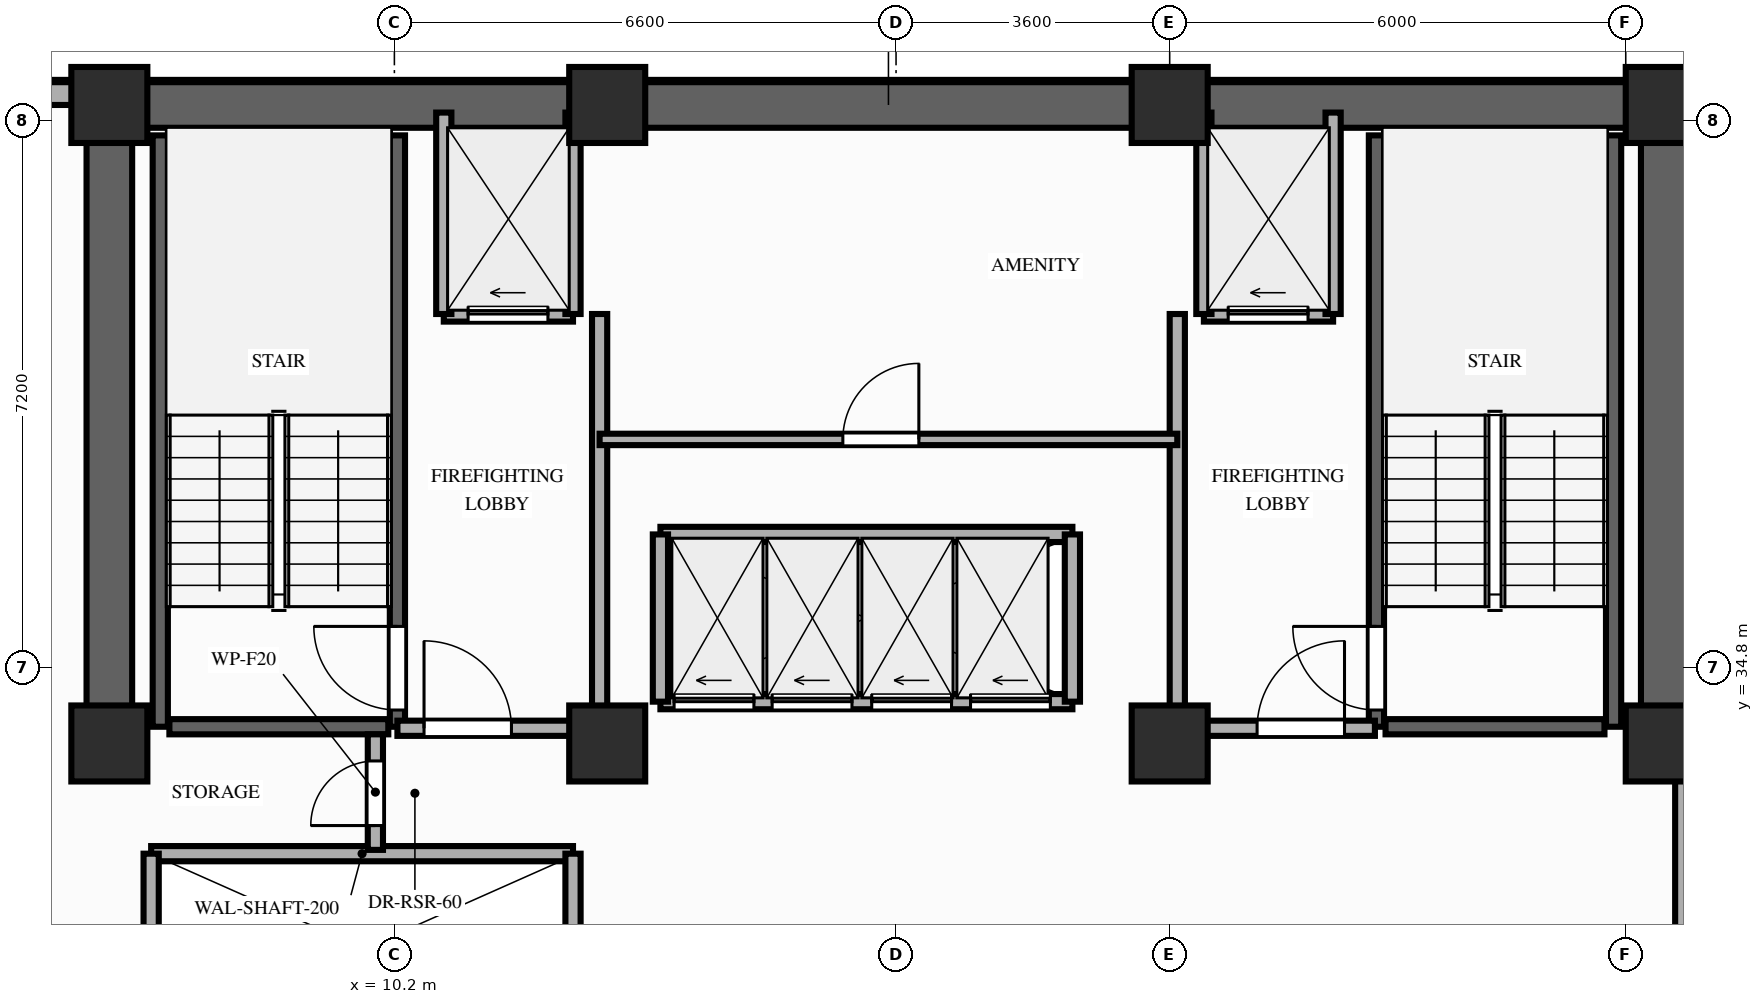
"""IFC4 building model, lengths in metres.
Left out: names, types, materials, properties, quantities, classifications, styles, units other than length and angle.
Written with IfcOpenShell. Run it as: python <this file> out.ifc"""

import sys

from ifc_helpers import new_model, si_unit, direction, frame, frame_2d, origin, origin_2d, place, context, subcontext, project, spatial, rectangle, extrude, element, fill, save


model = new_model("IFC4")
c1 = context("Model", 3, precision=1e-05, world=origin(), true_north=direction((0.0, 1.0)))
c2 = subcontext(c1, "Body", "Model", "MODEL_VIEW")
j1 = project(units=[si_unit("LENGTHUNIT", "METRE"), si_unit("PLANEANGLEUNIT", "RADIAN")], contexts=[c1])
p1 = place(None, origin())
s1 = spatial("IfcSite", under=j1, at=p1, CompositionType="ELEMENT")
p2 = place(p1, origin())
s2 = spatial("IfcBuilding", under=s1, at=p2, CompositionType="ELEMENT")
p3 = place(p2, frame((0.0, 0.0, 126.6)))
s3 = spatial("IfcBuildingStorey", under=s2, at=p3, CompositionType="ELEMENT", Elevation=126.6)
for number, where, z_axis, x_axis in (
    (1, (6.45, 33.8, 0.0), (0.0, 0.0, 1.0), (1.0, 0.0, 0.0)),
    (2, (13.0, 33.8, 0.0), (0.0, 0.0, 1.0), (1.0, 0.0, 0.0)),
    (3, (20.4, 33.8, 0.0), (0.0, 0.0, 1.0), (1.0, 0.0, 0.0)),
    (4, (26.9, 33.8, 0.0), (0.0, 0.0, 1.0), (1.0, 0.0, 0.0)),
    (5, (6.45, 42.2, 0.0), (0.0, 0.0, 1.0), (1.0, 0.0, 0.0)),
    (6, (13.0, 42.2, 0.0), (0.0, 0.0, 1.0), (1.0, 0.0, 0.0)),
    (7, (20.4, 42.2, 0.0), (0.0, 0.0, 1.0), (1.0, 0.0, 0.0)),
    (8, (26.9, 42.2, 0.0), (0.0, 0.0, 1.0), (1.0, 0.0, 0.0)),
):
    element("IfcColumn", number, at=place(p3, frame(where, z_axis=z_axis, x_axis=x_axis)), inside=s3, PredefinedType="COLUMN", context=c2, shape_type="SweptSolid", body=[
        extrude(rectangle(XDim=1.0, YDim=1.0, at=origin_2d()), origin(), (0.0, 0.0, 1.0), 3.2),
    ])
p4 = place(p3, frame((6.0, 42.35, 0.0), z_axis=(0.0, 0.0, 1.0), x_axis=(-1.0, 0.0, 0.0)))
e9 = element("IfcWall", 9, at=p4, inside=s3, PredefinedType="STANDARD", context=c2, shape_type="SweptSolid", body=[
    extrude(rectangle(XDim=2.0, YDim=0.3, at=frame_2d((1.0, 0.0))), origin(), (0.0, 0.0, 1.0), 3.02),
])
p5 = place(p3, frame((6.45, 42.2, 0.0), z_axis=(0.0, 0.0, 1.0), x_axis=(1.0, 0.0, 0.0)))
e10 = element("IfcWall", 10, at=p5, inside=s3, PredefinedType="SHEAR", context=c2, shape_type="SweptSolid", body=[
    extrude(rectangle(XDim=20.45, YDim=0.6, at=frame_2d((10.225, 0.0))), origin(), (0.0, 0.0, 1.0), 3.02),
])
for number, where, z_axis, x_axis in (
    (11, (6.45, 33.8, 0.0), (0.0, 0.0, 1.0), (0.0, 1.0, 0.0)),
    (12, (26.9, 33.8, 0.0), (0.0, 0.0, 1.0), (0.0, 1.0, 0.0)),
):
    element("IfcWall", number, at=place(p3, frame(where, z_axis=z_axis, x_axis=x_axis)), inside=s3, PredefinedType="SHEAR", context=c2, shape_type="SweptSolid", body=[
        extrude(rectangle(XDim=7.95, YDim=0.6, at=frame_2d((3.975, 0.0))), origin(), (0.0, 0.0, 1.0), 3.02),
    ])
p6 = place(p3, frame((7.12, 34.02, 0.0), z_axis=(0.0, 0.0, 1.0), x_axis=(0.0, 1.0, 0.0)))
e13 = element("IfcWall", 13, at=p6, inside=s3, PredefinedType="SHEAR", context=c2, shape_type="SweptSolid", body=[
    extrude(rectangle(XDim=7.78, YDim=0.2, at=frame_2d((3.89, 0.0))), origin(), (0.0, 0.0, 1.0), 3.02),
])
p7 = place(p3, frame((10.24, 34.02, 0.0), z_axis=(0.0, 0.0, 1.0), x_axis=(0.0, 1.0, 0.0)))
e14 = element("IfcWall", 14, at=p7, inside=s3, PredefinedType="SHEAR", context=c2, shape_type="SweptSolid", body=[
    extrude(rectangle(XDim=7.78, YDim=0.2, at=frame_2d((3.89, 0.0))), origin(), (0.0, 0.0, 1.0), 3.02),
])
p8 = place(p7, frame((0.22, 0.0, 0.0)))
e15 = element("IfcOpeningElement", 15, at=p8, cuts=e14, PredefinedType="OPENING", context=c2, shape_type="SweptSolid", body=[
    extrude(rectangle(XDim=1.1, YDim=2.15, at=frame_2d((0.55, 1.075))), frame((0.0, 0.11, 0.0), z_axis=(0.0, -1.0, 0.0), x_axis=(1.0, 0.0, 0.0)), (0.0, 0.0, 1.0), 0.22),
])
p9 = place(p3, frame((7.24, 34.02, 0.0), z_axis=(0.0, 0.0, 1.0), x_axis=(1.0, 0.0, 0.0)))
e16 = element("IfcWall", 16, at=p9, inside=s3, PredefinedType="SHEAR", context=c2, shape_type="SweptSolid", body=[
    extrude(rectangle(XDim=2.88, YDim=0.2, at=frame_2d((1.44, 0.0))), origin(), (0.0, 0.0, 1.0), 3.02),
])
p10 = place(p3, frame((23.12, 34.02, 0.0), z_axis=(0.0, 0.0, 1.0), x_axis=(0.0, 1.0, 0.0)))
e17 = element("IfcWall", 17, at=p10, inside=s3, PredefinedType="SHEAR", context=c2, shape_type="SweptSolid", body=[
    extrude(rectangle(XDim=7.78, YDim=0.2, at=frame_2d((3.89, 0.0))), origin(), (0.0, 0.0, 1.0), 3.02),
])
p11 = place(p10, frame((0.22, 0.0, 0.0)))
e18 = element("IfcOpeningElement", 18, at=p11, cuts=e17, PredefinedType="OPENING", context=c2, shape_type="SweptSolid", body=[
    extrude(rectangle(XDim=1.1, YDim=2.15, at=frame_2d((0.55, 1.075))), frame((0.0, 0.11, 0.0), z_axis=(0.0, -1.0, 0.0), x_axis=(1.0, 0.0, 0.0)), (0.0, 0.0, 1.0), 0.22),
])
p12 = place(p3, frame((26.24, 34.02, 0.0), z_axis=(0.0, 0.0, 1.0), x_axis=(0.0, 1.0, 0.0)))
e19 = element("IfcWall", 19, at=p12, inside=s3, PredefinedType="SHEAR", context=c2, shape_type="SweptSolid", body=[
    extrude(rectangle(XDim=7.78, YDim=0.2, at=frame_2d((3.89, 0.0))), origin(), (0.0, 0.0, 1.0), 3.02),
])
p13 = place(p3, frame((23.24, 34.02, 0.0), z_axis=(0.0, 0.0, 1.0), x_axis=(1.0, 0.0, 0.0)))
e20 = element("IfcWall", 20, at=p13, inside=s3, PredefinedType="SHEAR", context=c2, shape_type="SweptSolid", body=[
    extrude(rectangle(XDim=2.88, YDim=0.2, at=frame_2d((1.44, 0.0))), origin(), (0.0, 0.0, 1.0), 3.02),
])
p14 = place(p3, frame((7.0, 32.35, 0.0), z_axis=(0.0, 0.0, 1.0), x_axis=(1.0, 0.0, 0.0)))
e21 = element("IfcWall", 21, at=p14, inside=s3, PredefinedType="MOVABLE", context=c2, shape_type="SweptSolid", body=[
    extrude(rectangle(XDim=5.55, YDim=0.2, at=frame_2d((2.775, 0.0))), origin(), (0.0, 0.0, 1.0), 3.02),
])
for number, where, z_axis, x_axis in (
    (22, (7.0, 29.85, 0.0), (0.0, 0.0, 1.0), (0.0, 1.0, 0.0)),
    (23, (12.55, 29.85, 0.0), (0.0, 0.0, 1.0), (0.0, 1.0, 0.0)),
):
    element("IfcWall", number, at=place(p3, frame(where, z_axis=z_axis, x_axis=x_axis)), inside=s3, PredefinedType="MOVABLE", context=c2, shape_type="SweptSolid", body=[
        extrude(rectangle(XDim=2.5, YDim=0.2, at=frame_2d((1.25, 0.0))), origin(), (0.0, 0.0, 1.0), 3.02),
    ])
p15 = place(p3, frame((10.85, 39.45, 0.0), z_axis=(0.0, 0.0, 1.0), x_axis=(1.0, 0.0, 0.0)))
e24 = element("IfcWall", 24, at=p15, inside=s3, PredefinedType="MOVABLE", context=c2, shape_type="SweptSolid", body=[
    extrude(rectangle(XDim=1.7, YDim=0.2, at=frame_2d((0.85, 0.0))), origin(), (0.0, 0.0, 1.0), 3.02),
])
p16 = place(p15, frame((0.32, 0.0, 0.0)))
e25 = element("IfcOpeningElement", 25, at=p16, cuts=e24, PredefinedType="OPENING", context=c2, shape_type="SweptSolid", body=[
    extrude(rectangle(XDim=1.05, YDim=2.15, at=frame_2d((0.525, 1.075))), frame((0.0, 0.11, 0.0), z_axis=(0.0, -1.0, 0.0), x_axis=(1.0, 0.0, 0.0)), (0.0, 0.0, 1.0), 0.22),
])
p17 = place(p3, frame((20.85, 39.45, 0.0), z_axis=(0.0, 0.0, 1.0), x_axis=(1.0, 0.0, 0.0)))
e26 = element("IfcWall", 26, at=p17, inside=s3, PredefinedType="MOVABLE", context=c2, shape_type="SweptSolid", body=[
    extrude(rectangle(XDim=1.7, YDim=0.2, at=frame_2d((0.85, 0.0))), origin(), (0.0, 0.0, 1.0), 3.02),
])
p18 = place(p17, frame((0.32, 0.0, 0.0)))
e27 = element("IfcOpeningElement", 27, at=p18, cuts=e26, PredefinedType="OPENING", context=c2, shape_type="SweptSolid", body=[
    extrude(rectangle(XDim=1.05, YDim=2.15, at=frame_2d((0.525, 1.075))), frame((0.0, 0.11, 0.0), z_axis=(0.0, -1.0, 0.0), x_axis=(1.0, 0.0, 0.0)), (0.0, 0.0, 1.0), 0.22),
])
for number, where, z_axis, x_axis in (
    (28, (10.85, 39.45, 0.0), (0.0, 0.0, 1.0), (0.0, 1.0, 0.0)),
    (29, (12.55, 39.45, 0.0), (0.0, 0.0, 1.0), (0.0, 1.0, 0.0)),
):
    element("IfcWall", number, at=place(p3, frame(where, z_axis=z_axis, x_axis=x_axis)), inside=s3, PredefinedType="MOVABLE", context=c2, shape_type="SweptSolid", body=[
        extrude(rectangle(XDim=2.65, YDim=0.2, at=frame_2d((1.325, 0.0))), origin(), (0.0, 0.0, 1.0), 2.45),
    ])
p19 = place(p3, frame((12.9, 34.0, 0.0), z_axis=(0.0, 0.0, 1.0), x_axis=(0.0, 1.0, 0.0)))
e30 = element("IfcWall", 30, at=p19, inside=s3, PredefinedType="PARTITIONING", context=c2, shape_type="SweptSolid", body=[
    extrude(rectangle(XDim=5.45, YDim=0.2, at=frame_2d((2.725, 0.0))), origin(), (0.0, 0.0, 1.0), 2.45),
])
p20 = place(p3, frame((10.24, 34.0, 0.0), z_axis=(0.0, 0.0, 1.0), x_axis=(1.0, 0.0, 0.0)))
e31 = element("IfcWall", 31, at=p20, inside=s3, PredefinedType="PARTITIONING", context=c2, shape_type="SweptSolid", body=[
    extrude(rectangle(XDim=2.66, YDim=0.2, at=frame_2d((1.33, 0.0))), origin(), (0.0, 0.0, 1.0), 2.45),
])
p21 = place(p20, frame((0.35, 0.0, 0.0)))
e32 = element("IfcOpeningElement", 32, at=p21, cuts=e31, PredefinedType="OPENING", context=c2, shape_type="SweptSolid", body=[
    extrude(rectangle(XDim=1.15, YDim=2.15, at=frame_2d((0.575, 1.075))), frame((0.0, 0.11, 0.0), z_axis=(0.0, -1.0, 0.0), x_axis=(1.0, 0.0, 0.0)), (0.0, 0.0, 1.0), 0.22),
])
for number, where, z_axis, x_axis in (
    (33, (20.85, 39.45, 0.0), (0.0, 0.0, 1.0), (0.0, 1.0, 0.0)),
    (34, (22.55, 39.45, 0.0), (0.0, 0.0, 1.0), (0.0, 1.0, 0.0)),
):
    element("IfcWall", number, at=place(p3, frame(where, z_axis=z_axis, x_axis=x_axis)), inside=s3, PredefinedType="MOVABLE", context=c2, shape_type="SweptSolid", body=[
        extrude(rectangle(XDim=2.65, YDim=0.2, at=frame_2d((1.325, 0.0))), origin(), (0.0, 0.0, 1.0), 2.45),
    ])
p22 = place(p3, frame((20.5, 34.0, 0.0), z_axis=(0.0, 0.0, 1.0), x_axis=(0.0, 1.0, 0.0)))
e35 = element("IfcWall", 35, at=p22, inside=s3, PredefinedType="PARTITIONING", context=c2, shape_type="SweptSolid", body=[
    extrude(rectangle(XDim=5.45, YDim=0.2, at=frame_2d((2.725, 0.0))), origin(), (0.0, 0.0, 1.0), 2.45),
])
p23 = place(p3, frame((20.5, 34.0, 0.0), z_axis=(0.0, 0.0, 1.0), x_axis=(1.0, 0.0, 0.0)))
e36 = element("IfcWall", 36, at=p23, inside=s3, PredefinedType="PARTITIONING", context=c2, shape_type="SweptSolid", body=[
    extrude(rectangle(XDim=2.6, YDim=0.2, at=frame_2d((1.3, 0.0))), origin(), (0.0, 0.0, 1.0), 2.45),
])
p24 = place(p23, frame((1.05, 0.0, 0.0)))
e37 = element("IfcOpeningElement", 37, at=p24, cuts=e36, PredefinedType="OPENING", context=c2, shape_type="SweptSolid", body=[
    extrude(rectangle(XDim=1.15, YDim=2.15, at=frame_2d((0.575, 1.075))), frame((0.0, 0.11, 0.0), z_axis=(0.0, -1.0, 0.0), x_axis=(1.0, 0.0, 0.0)), (0.0, 0.0, 1.0), 0.22),
])
p25 = place(p3, frame((9.95, 32.4, 0.0), z_axis=(0.0, 0.0, 1.0), x_axis=(0.0, 1.0, 0.0)))
e38 = element("IfcWall", 38, at=p25, inside=s3, PredefinedType="PARTITIONING", context=c2, shape_type="SweptSolid", body=[
    extrude(rectangle(XDim=1.52, YDim=0.2, at=frame_2d((0.76, 0.0))), origin(), (0.0, 0.0, 1.0), 2.45),
])
p26 = place(p25, frame((0.32, 0.0, 0.0)))
e39 = element("IfcOpeningElement", 39, at=p26, cuts=e38, PredefinedType="OPENING", context=c2, shape_type="SweptSolid", body=[
    extrude(rectangle(XDim=0.85, YDim=2.05, at=frame_2d((0.425, 1.025))), frame((0.0, 0.11, 0.0), z_axis=(0.0, -1.0, 0.0), x_axis=(1.0, 0.0, 0.0)), (0.0, 0.0, 1.0), 0.22),
])
p27 = place(p3, frame((12.9, 37.8, 0.0), z_axis=(0.0, 0.0, 1.0), x_axis=(1.0, 0.0, 0.0)))
e40 = element("IfcWall", 40, at=p27, inside=s3, PredefinedType="PARTITIONING", context=c2, shape_type="SweptSolid", body=[
    extrude(rectangle(XDim=7.6, YDim=0.15, at=frame_2d((3.8, 0.0))), origin(), (0.0, 0.0, 1.0), 3.02),
])
p28 = place(p27, frame((3.2, 0.0, 0.0)))
e41 = element("IfcOpeningElement", 41, at=p28, cuts=e40, PredefinedType="OPENING", context=c2, shape_type="SweptSolid", body=[
    extrude(rectangle(XDim=1.0, YDim=2.15, at=frame_2d((0.5, 1.075))), frame((0.0, 0.085, 0.0), z_axis=(0.0, -1.0, 0.0), x_axis=(1.0, 0.0, 0.0)), (0.0, 0.0, 1.0), 0.17),
])
p29 = place(p3, frame((13.7, 34.35, 0.0), z_axis=(0.0, 0.0, 1.0), x_axis=(1.0, 0.0, 0.0)))
e42 = element("IfcWall", 42, at=p29, inside=s3, PredefinedType="MOVABLE", context=c2, shape_type="SweptSolid", body=[
    extrude(rectangle(XDim=5.42, YDim=0.2, at=frame_2d((2.71, 0.0))), origin(), (0.0, 0.0, 1.0), 3.02),
])
p30 = place(p29, frame((0.18, 0.0, 0.0)))
e43 = element("IfcOpeningElement", 43, at=p30, cuts=e42, PredefinedType="OPENING", context=c2, shape_type="SweptSolid", body=[
    extrude(rectangle(XDim=1.05, YDim=2.15, at=frame_2d((0.525, 1.075))), frame((0.0, 0.11, 0.0), z_axis=(0.0, -1.0, 0.0), x_axis=(1.0, 0.0, 0.0)), (0.0, 0.0, 1.0), 0.22),
])
p31 = place(p29, frame((1.47, 0.0, 0.0)))
e44 = element("IfcOpeningElement", 44, at=p31, cuts=e42, PredefinedType="OPENING", context=c2, shape_type="SweptSolid", body=[
    extrude(rectangle(XDim=1.05, YDim=2.15, at=frame_2d((0.525, 1.075))), frame((0.0, 0.11, 0.0), z_axis=(0.0, -1.0, 0.0), x_axis=(1.0, 0.0, 0.0)), (0.0, 0.0, 1.0), 0.22),
])
p32 = place(p29, frame((2.78, 0.0, 0.0)))
e45 = element("IfcOpeningElement", 45, at=p32, cuts=e42, PredefinedType="OPENING", context=c2, shape_type="SweptSolid", body=[
    extrude(rectangle(XDim=1.05, YDim=2.15, at=frame_2d((0.525, 1.075))), frame((0.0, 0.11, 0.0), z_axis=(0.0, -1.0, 0.0), x_axis=(1.0, 0.0, 0.0)), (0.0, 0.0, 1.0), 0.22),
])
p33 = place(p29, frame((4.08, 0.0, 0.0)))
e46 = element("IfcOpeningElement", 46, at=p33, cuts=e42, PredefinedType="OPENING", context=c2, shape_type="SweptSolid", body=[
    extrude(rectangle(XDim=1.05, YDim=2.15, at=frame_2d((0.525, 1.075))), frame((0.0, 0.11, 0.0), z_axis=(0.0, -1.0, 0.0), x_axis=(1.0, 0.0, 0.0)), (0.0, 0.0, 1.0), 0.22),
])
p34 = place(p3, frame((13.7, 36.55, 0.0), z_axis=(0.0, 0.0, 1.0), x_axis=(1.0, 0.0, 0.0)))
e47 = element("IfcWall", 47, at=p34, inside=s3, PredefinedType="MOVABLE", context=c2, shape_type="SweptSolid", body=[
    extrude(rectangle(XDim=5.42, YDim=0.2, at=frame_2d((2.71, 0.0))), origin(), (0.0, 0.0, 1.0), 3.02),
])
for number, where, z_axis, x_axis in (
    (48, (13.7, 34.35, 0.0), (0.0, 0.0, 1.0), (0.0, 1.0, 0.0)),
    (49, (19.12, 34.35, 0.0), (0.0, 0.0, 1.0), (0.0, 1.0, 0.0)),
):
    element("IfcWall", number, at=place(p3, frame(where, z_axis=z_axis, x_axis=x_axis)), inside=s3, PredefinedType="MOVABLE", context=c2, shape_type="SweptSolid", body=[
        extrude(rectangle(XDim=2.2, YDim=0.2, at=frame_2d((1.1, 0.0))), origin(), (0.0, 0.0, 1.0), 3.02),
    ])
p35 = place(p3, frame((27.15, 31.2, 0.0), z_axis=(0.0, 0.0, 1.0), x_axis=(0.0, 1.0, 0.0)))
e50 = element("IfcWall", 50, at=p35, inside=s3, PredefinedType="PARTITIONING", context=c2, shape_type="SweptSolid", body=[
    extrude(rectangle(XDim=2.48, YDim=0.2, at=frame_2d((1.24, 0.0))), origin(), (0.0, 0.0, 1.0), 2.45),
])
p36 = place(p8, origin())
e51 = element("IfcDoor", 51, at=p36, inside=s3, OperationType="SINGLE_SWING_RIGHT", PredefinedType="DOOR", context=c2, shape_type="SweptSolid", body=[
    extrude(rectangle(XDim=1.1, YDim=2.15, at=frame_2d((0.55, 1.075))), frame((0.0, 0.025, 0.0), z_axis=(0.0, -1.0, 0.0), x_axis=(1.0, 0.0, 0.0)), (0.0, 0.0, 1.0), 0.05),
])
fill(e15, e51)
p37 = place(p11, origin())
e52 = element("IfcDoor", 52, at=p37, inside=s3, OperationType="SINGLE_SWING_RIGHT", PredefinedType="DOOR", context=c2, shape_type="SweptSolid", body=[
    extrude(rectangle(XDim=1.1, YDim=2.15, at=frame_2d((0.55, 1.075))), frame((0.0, 0.025, 0.0), z_axis=(0.0, -1.0, 0.0), x_axis=(1.0, 0.0, 0.0)), (0.0, 0.0, 1.0), 0.05),
])
fill(e18, e52)
p38 = place(p16, origin())
e53 = element("IfcDoor", 53, at=p38, inside=s3, OperationType="SLIDING_TO_LEFT", PredefinedType="DOOR", context=c2, shape_type="SweptSolid", body=[
    extrude(rectangle(XDim=1.05, YDim=2.15, at=frame_2d((0.525, 1.075))), frame((0.0, 0.025, 0.0), z_axis=(0.0, -1.0, 0.0), x_axis=(1.0, 0.0, 0.0)), (0.0, 0.0, 1.0), 0.05),
])
fill(e25, e53)
p39 = place(p18, origin())
e54 = element("IfcDoor", 54, at=p39, inside=s3, OperationType="SLIDING_TO_LEFT", PredefinedType="DOOR", context=c2, shape_type="SweptSolid", body=[
    extrude(rectangle(XDim=1.05, YDim=2.15, at=frame_2d((0.525, 1.075))), frame((0.0, 0.025, 0.0), z_axis=(0.0, -1.0, 0.0), x_axis=(1.0, 0.0, 0.0)), (0.0, 0.0, 1.0), 0.05),
])
fill(e27, e54)
p40 = place(p21, origin())
e55 = element("IfcDoor", 55, at=p40, inside=s3, OperationType="SINGLE_SWING_LEFT", PredefinedType="DOOR", context=c2, shape_type="SweptSolid", body=[
    extrude(rectangle(XDim=1.15, YDim=2.15, at=frame_2d((0.575, 1.075))), frame((0.0, 0.025, 0.0), z_axis=(0.0, -1.0, 0.0), x_axis=(1.0, 0.0, 0.0)), (0.0, 0.0, 1.0), 0.05),
])
fill(e32, e55)
p41 = place(p24, origin())
e56 = element("IfcDoor", 56, at=p41, inside=s3, OperationType="SINGLE_SWING_RIGHT", PredefinedType="DOOR", context=c2, shape_type="SweptSolid", body=[
    extrude(rectangle(XDim=1.15, YDim=2.15, at=frame_2d((0.575, 1.075))), frame((0.0, 0.025, 0.0), z_axis=(0.0, -1.0, 0.0), x_axis=(1.0, 0.0, 0.0)), (0.0, 0.0, 1.0), 0.05),
])
fill(e37, e56)
p42 = place(p26, origin())
e57 = element("IfcDoor", 57, at=p42, inside=s3, OperationType="SINGLE_SWING_LEFT", PredefinedType="DOOR", context=c2, shape_type="SweptSolid", body=[
    extrude(rectangle(XDim=0.85, YDim=2.05, at=frame_2d((0.425, 1.025))), frame((0.0, 0.025, 0.0), z_axis=(0.0, -1.0, 0.0), x_axis=(1.0, 0.0, 0.0)), (0.0, 0.0, 1.0), 0.05),
])
fill(e39, e57)
p43 = place(p28, origin())
e58 = element("IfcDoor", 58, at=p43, inside=s3, OperationType="SINGLE_SWING_RIGHT", PredefinedType="DOOR", context=c2, shape_type="SweptSolid", body=[
    extrude(rectangle(XDim=1.0, YDim=2.15, at=frame_2d((0.5, 1.075))), frame((0.0, 0.025, 0.0), z_axis=(0.0, -1.0, 0.0), x_axis=(1.0, 0.0, 0.0)), (0.0, 0.0, 1.0), 0.05),
])
fill(e41, e58)
p44 = place(p30, origin())
e59 = element("IfcDoor", 59, at=p44, inside=s3, OperationType="SLIDING_TO_LEFT", PredefinedType="DOOR", context=c2, shape_type="SweptSolid", body=[
    extrude(rectangle(XDim=1.05, YDim=2.15, at=frame_2d((0.525, 1.075))), frame((0.0, 0.025, 0.0), z_axis=(0.0, -1.0, 0.0), x_axis=(1.0, 0.0, 0.0)), (0.0, 0.0, 1.0), 0.05),
])
fill(e43, e59)
p45 = place(p31, origin())
e60 = element("IfcDoor", 60, at=p45, inside=s3, OperationType="SLIDING_TO_LEFT", PredefinedType="DOOR", context=c2, shape_type="SweptSolid", body=[
    extrude(rectangle(XDim=1.05, YDim=2.15, at=frame_2d((0.525, 1.075))), frame((0.0, 0.025, 0.0), z_axis=(0.0, -1.0, 0.0), x_axis=(1.0, 0.0, 0.0)), (0.0, 0.0, 1.0), 0.05),
])
fill(e44, e60)
p46 = place(p32, origin())
e61 = element("IfcDoor", 61, at=p46, inside=s3, OperationType="SLIDING_TO_LEFT", PredefinedType="DOOR", context=c2, shape_type="SweptSolid", body=[
    extrude(rectangle(XDim=1.05, YDim=2.15, at=frame_2d((0.525, 1.075))), frame((0.0, 0.025, 0.0), z_axis=(0.0, -1.0, 0.0), x_axis=(1.0, 0.0, 0.0)), (0.0, 0.0, 1.0), 0.05),
])
fill(e45, e61)
p47 = place(p33, origin())
e62 = element("IfcDoor", 62, at=p47, inside=s3, OperationType="SLIDING_TO_LEFT", PredefinedType="DOOR", context=c2, shape_type="SweptSolid", body=[
    extrude(rectangle(XDim=1.05, YDim=2.15, at=frame_2d((0.525, 1.075))), frame((0.0, 0.025, 0.0), z_axis=(0.0, -1.0, 0.0), x_axis=(1.0, 0.0, 0.0)), (0.0, 0.0, 1.0), 0.05),
])
fill(e46, e62)
save(model, sys.argv[1])
